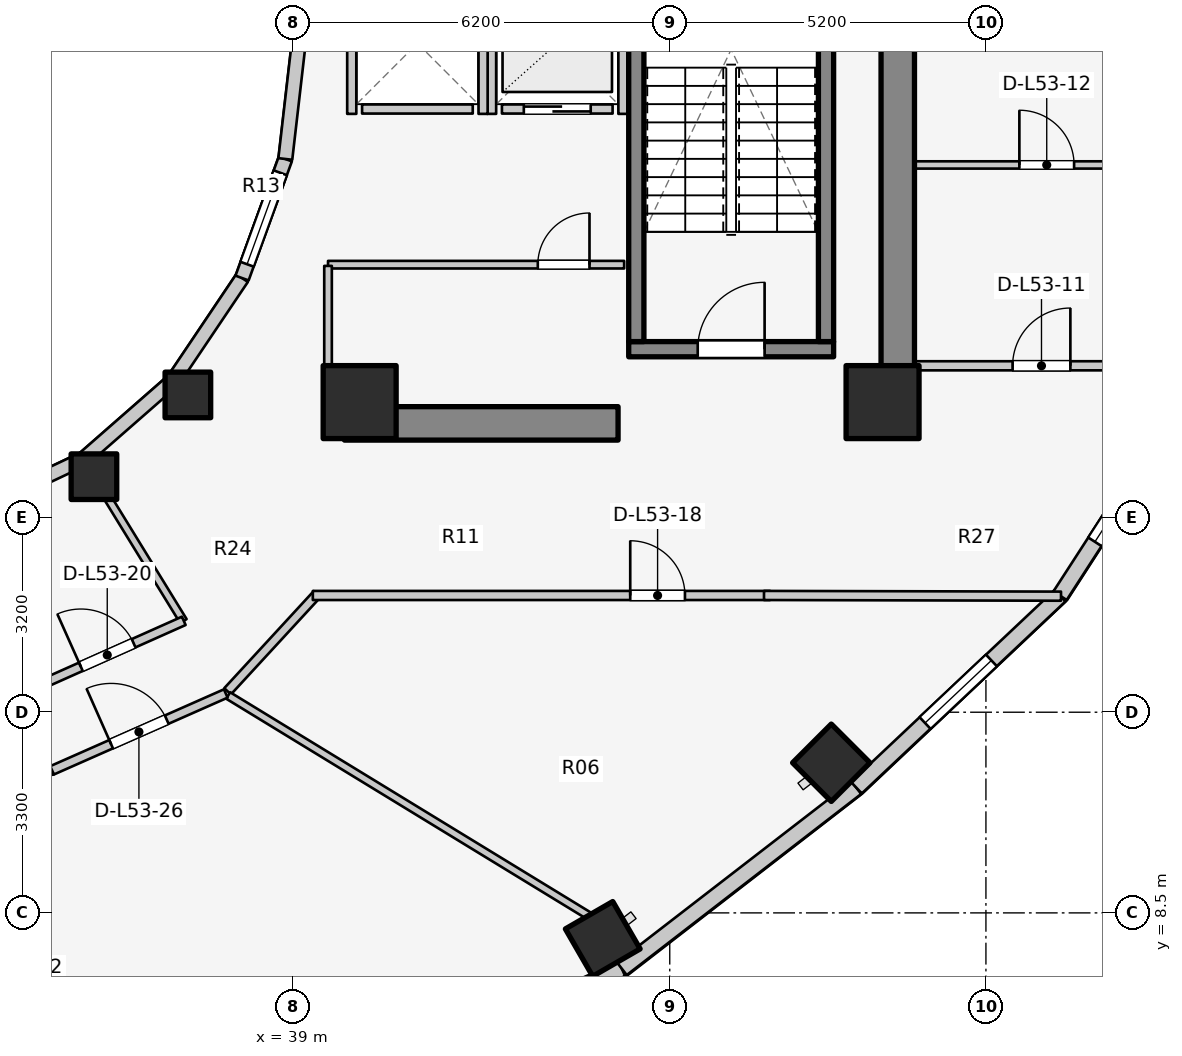
"""IFC4 building model, lengths in metres.
Left out: names, types, materials, properties, quantities, classifications, styles, units other than length and angle.
Written with IfcOpenShell. Run it as: python <this file> out.ifc"""

import sys

from ifc_helpers import new_model, si_unit, direction, frame, frame_2d, origin, origin_2d, place, context, subcontext, project, spatial, rectangle, extrude, element, fill, save


model = new_model("IFC4")
c1 = context("Model", 3, precision=1e-05, world=origin(), true_north=direction((0.0, 1.0)))
c2 = subcontext(c1, "Body", "Model", "MODEL_VIEW")
j1 = project(units=[si_unit("LENGTHUNIT", "METRE"), si_unit("PLANEANGLEUNIT", "RADIAN")], contexts=[c1])
p1 = place(None, origin())
s1 = spatial("IfcSite", under=j1, at=p1, CompositionType="ELEMENT")
p2 = place(p1, origin())
s2 = spatial("IfcBuilding", under=s1, at=p2, CompositionType="ELEMENT")
p3 = place(p2, frame((0.0, 0.0, 174.6)))
s3 = spatial("IfcBuildingStorey", under=s2, at=p3, CompositionType="ELEMENT", Elevation=174.6)
p4 = place(p3, frame((48.95, 17.05, 0.0), z_axis=(0.0, 0.0, 1.0), x_axis=(0.0, 1.0, 0.0)))
e1 = element("IfcWall", 1, at=p4, inside=s3, PredefinedType="SHEAR", context=c2, shape_type="SweptSolid", body=[
    extrude(rectangle(XDim=12.8, YDim=0.55, at=frame_2d((6.4, 0.0))), origin(), (0.0, 0.0, 1.0), 3.1),
])
p5 = place(p3, frame((39.85, 16.55, 0.0), z_axis=(0.0, 0.0, 1.0), x_axis=(1.0, 0.0, 0.0)))
e2 = element("IfcWall", 2, at=p5, inside=s3, PredefinedType="SHEAR", context=c2, shape_type="SweptSolid", body=[
    extrude(rectangle(XDim=4.5, YDim=0.55, at=frame_2d((2.25, 0.0))), origin(), (0.0, 0.0, 1.0), 3.1),
])
p6 = place(p3, frame((44.525, 17.77, 0.0), z_axis=(0.0, 0.0, 1.0), x_axis=(1.0, 0.0, 0.0)))
e3 = element("IfcWall", 3, at=p6, inside=s3, PredefinedType="SOLIDWALL", context=c2, shape_type="SweptSolid", body=[
    extrude(rectangle(XDim=3.37, YDim=0.25, at=frame_2d((1.685, 0.0))), origin(), (0.0, 0.0, 1.0), 3.1),
])
p7 = place(p6, frame((1.135, 0.0, 0.0)))
e4 = element("IfcOpeningElement", 4, at=p7, cuts=e3, PredefinedType="OPENING", context=c2, shape_type="SweptSolid", body=[
    extrude(rectangle(XDim=1.1, YDim=2.1, at=frame_2d((0.55, 1.05))), frame((0.0, 0.135, 0.0), z_axis=(0.0, -1.0, 0.0), x_axis=(1.0, 0.0, 0.0)), (0.0, 0.0, 1.0), 0.27),
])
for number, where, z_axis, x_axis in (
    (5, (44.65, 17.895, 0.0), (0.0, 0.0, 1.0), (0.0, 1.0, 0.0)),
    (6, (47.77, 17.895, 0.0), (0.0, 0.0, 1.0), (0.0, 1.0, 0.0)),
):
    element("IfcWall", number, at=place(p3, frame(where, z_axis=z_axis, x_axis=x_axis)), inside=s3, PredefinedType="SOLIDWALL", context=c2, shape_type="SweptSolid", body=[
        extrude(rectangle(XDim=7.81, YDim=0.25, at=frame_2d((3.905, 0.0))), origin(), (0.0, 0.0, 1.0), 3.1),
    ])
for number, where, z_axis, x_axis in (
    (7, (40.1, 16.9, 0.0), (0.0, 0.0, 1.0), (1.0, 0.0, 0.0)),
    (8, (48.7, 16.9, 0.0), (0.0, 0.0, 1.0), (1.0, 0.0, 0.0)),
):
    element("IfcColumn", number, at=place(p3, frame(where, z_axis=z_axis, x_axis=x_axis)), inside=s3, PredefinedType="COLUMN", context=c2, shape_type="SweptSolid", body=[
        extrude(rectangle(XDim=1.2, YDim=1.2, at=origin_2d()), origin(), (0.0, 0.0, 1.0), 3.1),
    ])
p8 = place(p3, frame((35.73, 15.673, 0.0), z_axis=(0.0, 0.0, 1.0), x_axis=(1.0, 0.0, 0.0)))
e9 = element("IfcColumn", 9, at=p8, inside=s3, PredefinedType="COLUMN", context=c2, shape_type="SweptSolid", body=[
    extrude(rectangle(XDim=0.75, YDim=0.75, at=origin_2d()), origin(), (0.0, 0.0, 1.0), 3.1),
])
p9 = place(p3, frame((44.098, 8.072, 0.0), z_axis=(0.0, 0.0, 1.0), x_axis=(0.5, -0.866025403784, 0.0)))
e10 = element("IfcColumn", 10, at=p9, inside=s3, PredefinedType="COLUMN", context=c2, shape_type="SweptSolid", body=[
    extrude(rectangle(XDim=0.9, YDim=0.9, at=origin_2d()), origin(), (0.0, 0.0, 1.0), 3.1),
])
p10 = place(p3, frame((37.275, 17.018, 0.0), z_axis=(0.0, 0.0, 1.0), x_axis=(1.0, 0.0, 0.0)))
e11 = element("IfcColumn", 11, at=p10, inside=s3, PredefinedType="COLUMN", context=c2, shape_type="SweptSolid", body=[
    extrude(rectangle(XDim=0.75, YDim=0.75, at=origin_2d()), origin(), (0.0, 0.0, 1.0), 3.1),
])
p11 = place(p3, frame((47.857, 10.969, 0.0), z_axis=(0.0, 0.0, 1.0), x_axis=(0.707106781187, -0.707106781187, 0.0)))
e12 = element("IfcColumn", 12, at=p11, inside=s3, PredefinedType="COLUMN", context=c2, shape_type="SweptSolid", body=[
    extrude(rectangle(XDim=0.9, YDim=0.9, at=origin_2d()), origin(), (0.0, 0.0, 1.0), 3.1),
])
p12 = place(p3, frame((33.843, 15.157, 0.0), z_axis=(0.0, 0.0, 1.0), x_axis=(0.904179699603, 0.427152280606, 0.0)))
e13 = element("IfcWall", 13, at=p12, inside=s3, PredefinedType="STANDARD", context=c2, shape_type="SweptSolid", body=[
    extrude(rectangle(XDim=1.899, YDim=0.23, at=frame_2d((0.95, 0.0))), origin(), (0.0, 0.0, 1.0), 2.16),
])
p13 = place(p3, frame((35.56, 15.968, 0.0), z_axis=(0.0, 0.0, 1.0), x_axis=(0.752576694707, 0.658504607869, 0.0)))
e14 = element("IfcWall", 14, at=p13, inside=s3, PredefinedType="STANDARD", context=c2, shape_type="SweptSolid", body=[
    extrude(rectangle(XDim=1.959, YDim=0.23, at=frame_2d((0.98, 0.0))), origin(), (0.0, 0.0, 1.0), 2.16),
])
p14 = place(p3, frame((37.035, 17.258, 0.0), z_axis=(0.0, 0.0, 1.0), x_axis=(0.558197800898, 0.829707909492, 0.0)))
e15 = element("IfcWall", 15, at=p14, inside=s3, PredefinedType="STANDARD", context=c2, shape_type="SweptSolid", body=[
    extrude(rectangle(XDim=2.027, YDim=0.23, at=frame_2d((1.013, 0.0))), origin(), (0.0, 0.0, 1.0), 2.16),
])
p15 = place(p3, frame((38.166, 18.94, 0.0), z_axis=(0.0, 0.0, 1.0), x_axis=(0.341423187295, 0.93990968033, 0.0)))
e16 = element("IfcWall", 16, at=p15, inside=s3, PredefinedType="STANDARD", context=c2, shape_type="SweptSolid", body=[
    extrude(rectangle(XDim=2.084, YDim=0.23, at=frame_2d((1.042, 0.0))), origin(), (0.0, 0.0, 1.0), 2.84),
])
p16 = place(p15, frame((0.242, 0.0, 0.85)))
e17 = element("IfcOpeningElement", 17, at=p16, cuts=e16, PredefinedType="OPENING", context=c2, shape_type="SweptSolid", body=[
    extrude(rectangle(XDim=1.6, YDim=1.65, at=frame_2d((0.8, 0.825))), frame((0.0, 0.125, 0.0), z_axis=(0.0, -1.0, 0.0), x_axis=(1.0, 0.0, 0.0)), (0.0, 0.0, 1.0), 0.25),
])
p17 = place(p3, frame((38.877, 20.898, 0.0), z_axis=(0.0, 0.0, 1.0), x_axis=(0.114711713601, 0.993398823617, 0.0)))
e18 = element("IfcWall", 18, at=p17, inside=s3, PredefinedType="STANDARD", context=c2, shape_type="SweptSolid", body=[
    extrude(rectangle(XDim=2.115, YDim=0.23, at=frame_2d((1.058, 0.0))), origin(), (0.0, 0.0, 1.0), 2.84),
])
p18 = place(p3, frame((39.365, 5.315, 0.0), z_axis=(0.0, 0.0, 1.0), x_axis=(0.912353637112, 0.409403029847, 0.0)))
e19 = element("IfcWall", 19, at=p18, inside=s3, PredefinedType="STANDARD", context=c2, shape_type="SweptSolid", body=[
    extrude(rectangle(XDim=5.533, YDim=0.26, at=frame_2d((2.766, 0.0))), origin(), (0.0, 0.0, 1.0), 2.85),
])
p19 = place(p18, frame((1.566, 0.0, 0.75)))
e20 = element("IfcOpeningElement", 20, at=p19, cuts=e19, PredefinedType="OPENING", context=c2, shape_type="SweptSolid", body=[
    extrude(rectangle(XDim=2.4, YDim=1.7, at=frame_2d((1.2, 0.85))), frame((0.0, 0.14, 0.0), z_axis=(0.0, -1.0, 0.0), x_axis=(1.0, 0.0, 0.0)), (0.0, 0.0, 1.0), 0.28),
])
p20 = place(p3, frame((44.413, 7.581, 0.0), z_axis=(0.0, 0.0, 1.0), x_axis=(0.791460185804, 0.611220724687, 0.0)))
e21 = element("IfcWall", 21, at=p20, inside=s3, PredefinedType="STANDARD", context=c2, shape_type="SweptSolid", body=[
    extrude(rectangle(XDim=4.872, YDim=0.26, at=frame_2d((2.436, 0.0))), origin(), (0.0, 0.0, 1.0), 2.85),
])
p21 = place(p3, frame((48.269, 10.559, 0.0), z_axis=(0.0, 0.0, 1.0), x_axis=(0.727667301037, 0.68593024354, 0.0)))
e22 = element("IfcWall", 22, at=p21, inside=s3, PredefinedType="STANDARD", context=c2, shape_type="SweptSolid", body=[
    extrude(rectangle(XDim=4.604, YDim=0.26, at=frame_2d((2.302, 0.0))), origin(), (0.0, 0.0, 1.0), 2.85),
])
p22 = place(p21, frame((1.552, 0.0, 0.75)))
e23 = element("IfcOpeningElement", 23, at=p22, cuts=e22, PredefinedType="OPENING", context=c2, shape_type="SweptSolid", body=[
    extrude(rectangle(XDim=1.5, YDim=1.6, at=frame_2d((0.75, 0.8))), frame((0.0, 0.14, 0.0), z_axis=(0.0, -1.0, 0.0), x_axis=(1.0, 0.0, 0.0)), (0.0, 0.0, 1.0), 0.28),
])
p23 = place(p3, frame((51.619, 13.716, 0.0), z_axis=(0.0, 0.0, 1.0), x_axis=(0.543358984534, 0.839500454989, 0.0)))
e24 = element("IfcWall", 24, at=p23, inside=s3, PredefinedType="STANDARD", context=c2, shape_type="SweptSolid", body=[
    extrude(rectangle(XDim=4.511, YDim=0.26, at=frame_2d((2.256, 0.0))), origin(), (0.0, 0.0, 1.0), 2.85),
])
p24 = place(p23, frame((1.056, 0.0, 0.75)))
e25 = element("IfcOpeningElement", 25, at=p24, cuts=e24, PredefinedType="OPENING", context=c2, shape_type="SweptSolid", body=[
    extrude(rectangle(XDim=2.4, YDim=1.7, at=frame_2d((1.2, 0.85))), frame((0.0, 0.14, 0.0), z_axis=(0.0, -1.0, 0.0), x_axis=(1.0, 0.0, 0.0)), (0.0, 0.0, 1.0), 0.28),
])
p25 = place(p3, frame((42.44, 21.72, 0.0), z_axis=(0.0, 0.0, 1.0), x_axis=(1.0, 0.0, 0.0)))
e26 = element("IfcWall", 26, at=p25, inside=s3, PredefinedType="SOLIDWALL", context=c2, shape_type="SweptSolid", body=[
    extrude(rectangle(XDim=1.82, YDim=0.15, at=frame_2d((0.91, 0.0))), origin(), (0.0, 0.0, 1.0), 2.855),
])
p26 = place(p25, frame((0.36, 0.0, 0.0)))
e27 = element("IfcOpeningElement", 27, at=p26, cuts=e26, PredefinedType="OPENING", context=c2, shape_type="SweptSolid", body=[
    extrude(rectangle(XDim=1.1, YDim=2.1, at=frame_2d((0.55, 1.05))), frame((0.0, 0.085, 0.0), z_axis=(0.0, -1.0, 0.0), x_axis=(1.0, 0.0, 0.0)), (0.0, 0.0, 1.0), 0.17),
])
for number, where, z_axis, x_axis in (
    (28, (42.27, 21.64, 0.0), (0.0, 0.0, 1.0), (0.0, 1.0, 0.0)),
    (29, (44.43, 21.64, 0.0), (0.0, 0.0, 1.0), (0.0, 1.0, 0.0)),
):
    element("IfcWall", number, at=place(p3, frame(where, z_axis=z_axis, x_axis=x_axis)), inside=s3, PredefinedType="SOLIDWALL", context=c2, shape_type="SweptSolid", body=[
        extrude(rectangle(XDim=2.32, YDim=0.15, at=frame_2d((1.16, 0.0))), origin(), (0.0, 0.0, 1.0), 2.855),
    ])
p27 = place(p3, frame((40.14, 21.72, 0.0), z_axis=(0.0, 0.0, 1.0), x_axis=(1.0, 0.0, 0.0)))
e30 = element("IfcWall", 30, at=p27, inside=s3, PredefinedType="SOLIDWALL", context=c2, shape_type="SweptSolid", body=[
    extrude(rectangle(XDim=1.82, YDim=0.15, at=frame_2d((0.91, 0.0))), origin(), (0.0, 0.0, 1.0), 2.12),
])
p28 = place(p3, frame((39.97, 21.64, 0.0), z_axis=(0.0, 0.0, 1.0), x_axis=(0.0, 1.0, 0.0)))
e31 = element("IfcWall", 31, at=p28, inside=s3, PredefinedType="SOLIDWALL", context=c2, shape_type="SweptSolid", body=[
    extrude(rectangle(XDim=2.32, YDim=0.15, at=frame_2d((1.16, 0.0))), origin(), (0.0, 0.0, 1.0), 2.12),
])
p29 = place(p3, frame((42.13, 21.64, 0.0), z_axis=(0.0, 0.0, 1.0), x_axis=(0.0, 1.0, 0.0)))
e32 = element("IfcWall", 32, at=p29, inside=s3, PredefinedType="SOLIDWALL", context=c2, shape_type="SweptSolid", body=[
    extrude(rectangle(XDim=2.32, YDim=0.15, at=frame_2d((1.16, 0.0))), origin(), (0.0, 0.0, 1.0), 2.855),
])
p30 = place(p3, frame((39.58, 19.16, 0.0), z_axis=(0.0, 0.0, 1.0), x_axis=(1.0, 0.0, 0.0)))
e33 = element("IfcWall", 33, at=p30, inside=s3, PredefinedType="PARTITIONING", context=c2, shape_type="SweptSolid", body=[
    extrude(rectangle(XDim=4.87, YDim=0.125, at=frame_2d((2.435, 0.0))), origin(), (0.0, 0.0, 1.0), 2.12),
])
p31 = place(p30, frame((3.45, 0.0, 0.0)))
e34 = element("IfcOpeningElement", 34, at=p31, cuts=e33, PredefinedType="OPENING", context=c2, shape_type="SweptSolid", body=[
    extrude(rectangle(XDim=0.85, YDim=2.05, at=frame_2d((0.425, 1.025))), frame((0.0, 0.073, 0.0), z_axis=(0.0, -1.0, 0.0), x_axis=(1.0, 0.0, 0.0)), (0.0, 0.0, 1.0), 0.145),
])
p32 = place(p3, frame((39.58, 17.1, 0.0), z_axis=(0.0, 0.0, 1.0), x_axis=(0.0, 1.0, 0.0)))
e35 = element("IfcWall", 35, at=p32, inside=s3, PredefinedType="PARTITIONING", context=c2, shape_type="SweptSolid", body=[
    extrude(rectangle(XDim=2.04, YDim=0.125, at=frame_2d((1.02, 0.0))), origin(), (0.0, 0.0, 1.0), 2.232),
])
p33 = place(p3, frame((48.95, 17.497, 0.0), z_axis=(0.0, 0.0, 1.0), x_axis=(1.0, 0.0, 0.0)))
e36 = element("IfcWall", 36, at=p33, inside=s3, PredefinedType="PARTITIONING", context=c2, shape_type="SweptSolid", body=[
    extrude(rectangle(XDim=5.14, YDim=0.15, at=frame_2d((2.57, 0.0))), origin(), (0.0, 0.0, 1.0), 2.855),
])
p34 = place(p33, frame((1.889, 0.0, 0.0)))
e37 = element("IfcOpeningElement", 37, at=p34, cuts=e36, PredefinedType="OPENING", context=c2, shape_type="SweptSolid", body=[
    extrude(rectangle(XDim=0.95, YDim=2.1, at=frame_2d((0.475, 1.05))), frame((0.0, 0.085, 0.0), z_axis=(0.0, -1.0, 0.0), x_axis=(1.0, 0.0, 0.0)), (0.0, 0.0, 1.0), 0.17),
])
p35 = place(p3, frame((48.95, 20.8, 0.0), z_axis=(0.0, 0.0, 1.0), x_axis=(1.0, 0.0, 0.0)))
e38 = element("IfcWall", 38, at=p35, inside=s3, PredefinedType="MOVABLE", context=c2, shape_type="SweptSolid", body=[
    extrude(rectangle(XDim=5.554, YDim=0.12, at=frame_2d((2.777, 0.0))), origin(), (0.0, 0.0, 1.0), 2.855),
])
p36 = place(p35, frame((2.0, 0.0, 0.0)))
e39 = element("IfcOpeningElement", 39, at=p36, cuts=e38, PredefinedType="OPENING", context=c2, shape_type="SweptSolid", body=[
    extrude(rectangle(XDim=0.9, YDim=2.1, at=frame_2d((0.45, 1.05))), frame((0.0, 0.07, 0.0), z_axis=(0.0, -1.0, 0.0), x_axis=(1.0, 0.0, 0.0)), (0.0, 0.0, 1.0), 0.14),
])
p37 = place(p3, frame((37.928, 12.144, 0.0), z_axis=(0.0, 0.0, 1.0), x_axis=(0.677579737957, 0.735449317567, 0.0)))
e40 = element("IfcWall", 40, at=p37, inside=s3, PredefinedType="PARTITIONING", context=c2, shape_type="SweptSolid", body=[
    extrude(rectangle(XDim=2.173, YDim=0.15, at=frame_2d((1.086, 0.0))), origin(), (0.0, 0.0, 1.0), 2.299),
])
p38 = place(p3, frame((39.33, 13.72, 0.0), z_axis=(0.0, 0.0, 1.0), x_axis=(1.0, 0.0, 0.0)))
e41 = element("IfcWall", 41, at=p38, inside=s3, PredefinedType="PARTITIONING", context=c2, shape_type="SweptSolid", body=[
    extrude(rectangle(XDim=7.52, YDim=0.15, at=frame_2d((3.76, 0.0))), origin(), (0.0, 0.0, 1.0), 2.299),
])
p39 = place(p38, frame((5.22, 0.0, 0.0)))
e42 = element("IfcOpeningElement", 42, at=p39, cuts=e41, PredefinedType="OPENING", context=c2, shape_type="SweptSolid", body=[
    extrude(rectangle(XDim=0.9, YDim=2.1, at=frame_2d((0.45, 1.05))), frame((0.0, 0.085, 0.0), z_axis=(0.0, -1.0, 0.0), x_axis=(1.0, 0.0, 0.0)), (0.0, 0.0, 1.0), 0.17),
])
p40 = place(p3, frame((46.75, 13.72, 0.0), z_axis=(0.0, 0.0, 1.0), x_axis=(0.999997122315, -0.00239903348, 0.0)))
e43 = element("IfcWall", 43, at=p40, inside=s3, PredefinedType="PARTITIONING", context=c2, shape_type="SweptSolid", body=[
    extrude(rectangle(XDim=4.885, YDim=0.15, at=frame_2d((2.442, 0.0))), origin(), (0.0, 0.0, 1.0), 2.22),
])
p41 = place(p3, frame((35.55, 15.985, 0.0), z_axis=(0.0, 0.0, 1.0), x_axis=(0.523587550846, -0.851971875474, 0.0)))
e44 = element("IfcWall", 44, at=p41, inside=s3, PredefinedType="PARTITIONING", context=c2, shape_type="SweptSolid", body=[
    extrude(rectangle(XDim=3.153, YDim=0.125, at=frame_2d((1.577, 0.0))), origin(), (0.0, 0.0, 1.0), 2.299),
])
p42 = place(p3, frame((34.69, 12.179, 0.0), z_axis=(0.0, 0.0, 1.0), x_axis=(0.913145536541, 0.407633694749, 0.0)))
e45 = element("IfcWall", 45, at=p42, inside=s3, PredefinedType="PARTITIONING", context=c2, shape_type="SweptSolid", body=[
    extrude(rectangle(XDim=2.756, YDim=0.15, at=frame_2d((1.378, 0.0))), origin(), (0.0, 0.0, 1.0), 2.299),
])
p43 = place(p42, frame((0.903, 0.0, 0.0)))
e46 = element("IfcOpeningElement", 46, at=p43, cuts=e45, PredefinedType="OPENING", context=c2, shape_type="SweptSolid", body=[
    extrude(rectangle(XDim=0.95, YDim=2.1, at=frame_2d((0.475, 1.05))), frame((0.0, 0.085, 0.0), z_axis=(0.0, -1.0, 0.0), x_axis=(1.0, 0.0, 0.0)), (0.0, 0.0, 1.0), 0.17),
])
p44 = place(p3, frame((37.938, 12.075, 0.0), z_axis=(0.0, 0.0, 1.0), x_axis=(0.853440334679, -0.521190555501, 0.0)))
e47 = element("IfcWall", 47, at=p44, inside=s3, PredefinedType="PARTITIONING", context=c2, shape_type="SweptSolid", body=[
    extrude(rectangle(XDim=6.966, YDim=0.125, at=frame_2d((3.483, 0.0))), origin(), (0.0, 0.0, 1.0), 2.299),
])
p45 = place(p3, frame((31.992, 10.418, 0.0), z_axis=(0.0, 0.0, 1.0), x_axis=(0.990254709652, 0.13926812274, 0.0)))
e48 = element("IfcWall", 48, at=p45, inside=s3, PredefinedType="PARTITIONING", context=c2, shape_type="SweptSolid", body=[
    extrude(rectangle(XDim=3.096, YDim=0.15, at=frame_2d((1.548, 0.0))), origin(), (0.0, 0.0, 1.0), 2.299),
])
p46 = place(p3, frame((35.042, 10.844, 0.0), z_axis=(0.0, 0.0, 1.0), x_axis=(0.914519212393, 0.40454247016, 0.0)))
e49 = element("IfcWall", 49, at=p46, inside=s3, PredefinedType="PARTITIONING", context=c2, shape_type="SweptSolid", body=[
    extrude(rectangle(XDim=3.124, YDim=0.15, at=frame_2d((1.562, 0.0))), origin(), (0.0, 0.0, 1.0), 2.299),
])
p47 = place(p46, frame((1.062, 0.0, 0.0)))
e50 = element("IfcOpeningElement", 50, at=p47, cuts=e49, PredefinedType="OPENING", context=c2, shape_type="SweptSolid", body=[
    extrude(rectangle(XDim=1.0, YDim=2.1, at=frame_2d((0.5, 1.05))), frame((0.0, 0.085, 0.0), z_axis=(0.0, -1.0, 0.0), x_axis=(1.0, 0.0, 0.0)), (0.0, 0.0, 1.0), 0.17),
])
p48 = place(p16, origin())
e51 = element("IfcWindow", 51, at=p48, inside=s3, PartitioningType="SINGLE_PANEL", PredefinedType="WINDOW", context=c2, shape_type="SweptSolid", body=[
    extrude(rectangle(XDim=1.6, YDim=1.65, at=frame_2d((0.8, 0.825))), frame((0.0, 0.03, 0.0), z_axis=(0.0, -1.0, 0.0), x_axis=(1.0, 0.0, 0.0)), (0.0, 0.0, 1.0), 0.06),
])
fill(e17, e51)
p49 = place(p22, origin())
e52 = element("IfcWindow", 52, at=p49, inside=s3, PartitioningType="SINGLE_PANEL", PredefinedType="WINDOW", context=c2, shape_type="SweptSolid", body=[
    extrude(rectangle(XDim=1.5, YDim=1.6, at=frame_2d((0.75, 0.8))), frame((0.0, 0.03, 0.0), z_axis=(0.0, -1.0, 0.0), x_axis=(1.0, 0.0, 0.0)), (0.0, 0.0, 1.0), 0.06),
])
fill(e23, e52)
p50 = place(p24, origin())
e53 = element("IfcWindow", 53, at=p50, inside=s3, PartitioningType="SINGLE_PANEL", PredefinedType="WINDOW", context=c2, shape_type="SweptSolid", body=[
    extrude(rectangle(XDim=2.4, YDim=1.7, at=frame_2d((1.2, 0.85))), frame((0.0, 0.03, 0.0), z_axis=(0.0, -1.0, 0.0), x_axis=(1.0, 0.0, 0.0)), (0.0, 0.0, 1.0), 0.06),
])
fill(e25, e53)
p51 = place(p7, origin())
e54 = element("IfcDoor", 54, at=p51, inside=s3, OperationType="SINGLE_SWING_RIGHT", PredefinedType="DOOR", context=c2, shape_type="SweptSolid", body=[
    extrude(rectangle(XDim=1.1, YDim=2.1, at=frame_2d((0.55, 1.05))), frame((0.0, 0.025, 0.0), z_axis=(0.0, -1.0, 0.0), x_axis=(1.0, 0.0, 0.0)), (0.0, 0.0, 1.0), 0.05),
])
fill(e4, e54)
p52 = place(p26, origin())
e55 = element("IfcDoor", 55, at=p52, inside=s3, OperationType="DOUBLE_DOOR_SLIDING", PredefinedType="DOOR", context=c2, shape_type="SweptSolid", body=[
    extrude(rectangle(XDim=1.1, YDim=2.1, at=frame_2d((0.55, 1.05))), frame((0.0, 0.025, 0.0), z_axis=(0.0, -1.0, 0.0), x_axis=(1.0, 0.0, 0.0)), (0.0, 0.0, 1.0), 0.05),
])
fill(e27, e55)
p53 = place(p31, origin())
e56 = element("IfcDoor", 56, at=p53, inside=s3, OperationType="SINGLE_SWING_RIGHT", PredefinedType="DOOR", context=c2, shape_type="SweptSolid", body=[
    extrude(rectangle(XDim=0.85, YDim=2.05, at=frame_2d((0.425, 1.025))), frame((0.0, 0.025, 0.0), z_axis=(0.0, -1.0, 0.0), x_axis=(1.0, 0.0, 0.0)), (0.0, 0.0, 1.0), 0.05),
])
fill(e34, e56)
p54 = place(p34, origin())
e57 = element("IfcDoor", 57, at=p54, inside=s3, OperationType="SINGLE_SWING_RIGHT", PredefinedType="DOOR", context=c2, shape_type="SweptSolid", body=[
    extrude(rectangle(XDim=0.95, YDim=2.1, at=frame_2d((0.475, 1.05))), frame((0.0, 0.025, 0.0), z_axis=(0.0, -1.0, 0.0), x_axis=(1.0, 0.0, 0.0)), (0.0, 0.0, 1.0), 0.05),
])
fill(e37, e57)
p55 = place(p36, origin())
e58 = element("IfcDoor", 58, at=p55, inside=s3, OperationType="SINGLE_SWING_LEFT", PredefinedType="DOOR", context=c2, shape_type="SweptSolid", body=[
    extrude(rectangle(XDim=0.9, YDim=2.1, at=frame_2d((0.45, 1.05))), frame((0.0, 0.025, 0.0), z_axis=(0.0, -1.0, 0.0), x_axis=(1.0, 0.0, 0.0)), (0.0, 0.0, 1.0), 0.05),
])
fill(e39, e58)
p56 = place(p39, origin())
e59 = element("IfcDoor", 59, at=p56, inside=s3, OperationType="SINGLE_SWING_LEFT", PredefinedType="DOOR", context=c2, shape_type="SweptSolid", body=[
    extrude(rectangle(XDim=0.9, YDim=2.1, at=frame_2d((0.45, 1.05))), frame((0.0, 0.025, 0.0), z_axis=(0.0, -1.0, 0.0), x_axis=(1.0, 0.0, 0.0)), (0.0, 0.0, 1.0), 0.05),
])
fill(e42, e59)
p57 = place(p43, origin())
e60 = element("IfcDoor", 60, at=p57, inside=s3, OperationType="SINGLE_SWING_LEFT", PredefinedType="DOOR", context=c2, shape_type="SweptSolid", body=[
    extrude(rectangle(XDim=0.95, YDim=2.1, at=frame_2d((0.475, 1.05))), frame((0.0, 0.025, 0.0), z_axis=(0.0, -1.0, 0.0), x_axis=(1.0, 0.0, 0.0)), (0.0, 0.0, 1.0), 0.05),
])
fill(e46, e60)
p58 = place(p47, origin())
e61 = element("IfcDoor", 61, at=p58, inside=s3, OperationType="SINGLE_SWING_LEFT", PredefinedType="DOOR", context=c2, shape_type="SweptSolid", body=[
    extrude(rectangle(XDim=1.0, YDim=2.1, at=frame_2d((0.5, 1.05))), frame((0.0, 0.025, 0.0), z_axis=(0.0, -1.0, 0.0), x_axis=(1.0, 0.0, 0.0)), (0.0, 0.0, 1.0), 0.05),
])
fill(e50, e61)
save(model, sys.argv[1])
